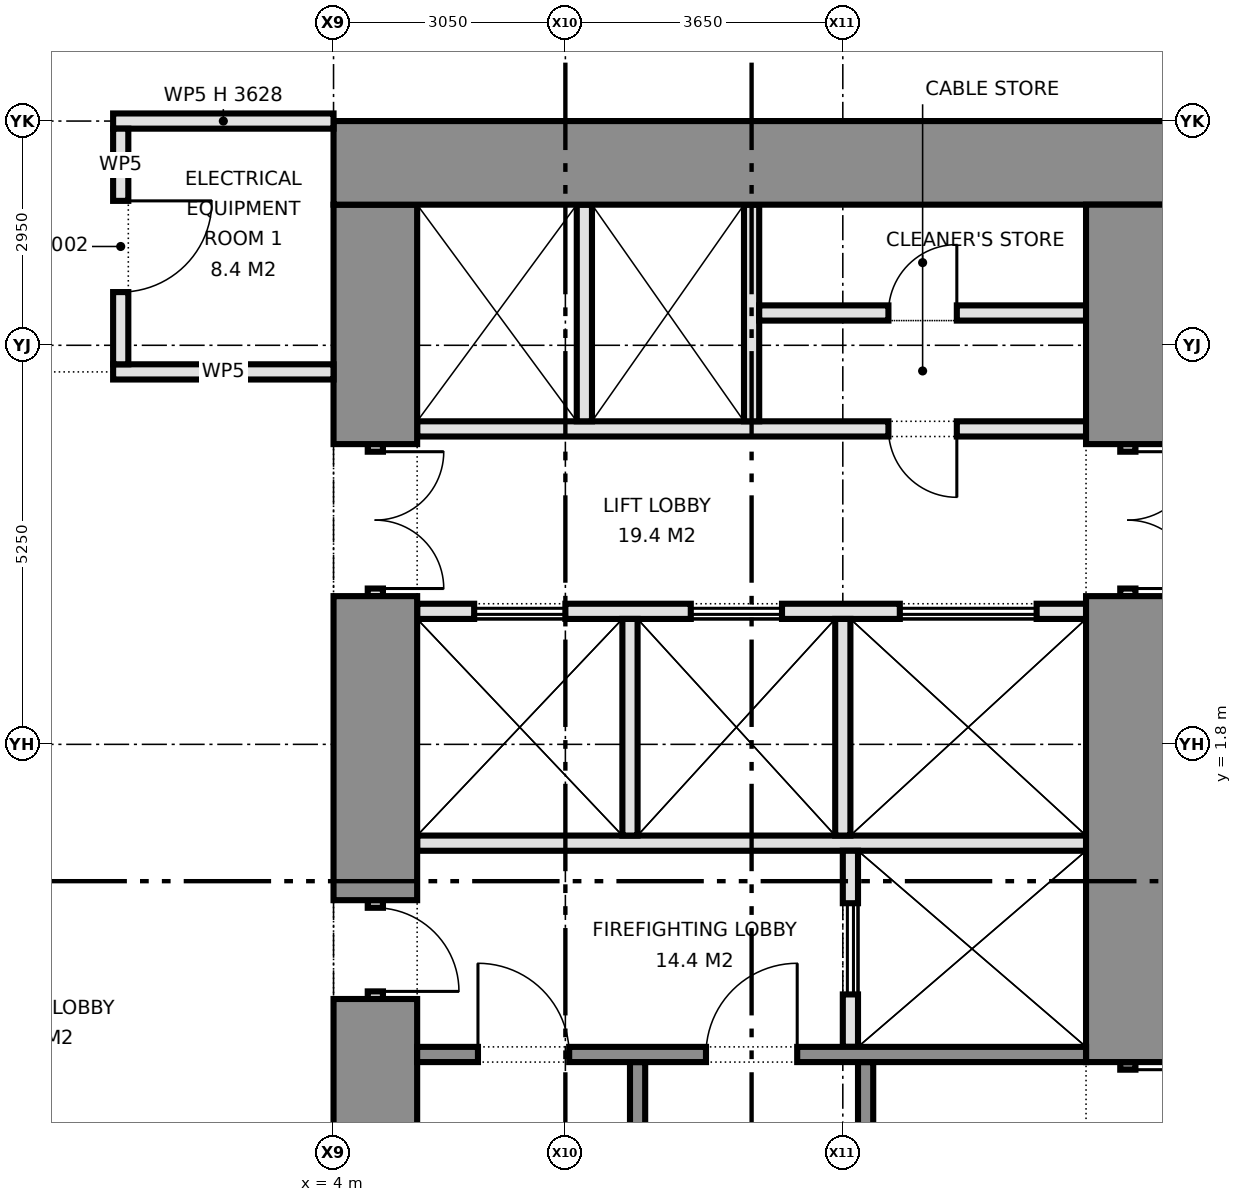
"""IFC4 building model, lengths in metres.
Left out: names, types, materials, properties, quantities, classifications, styles, units other than length and angle.
Written with IfcOpenShell. Run it as: python <this file> out.ifc"""

import sys

from ifc_helpers import new_model, si_unit, direction, frame, frame_2d, origin, place, context, subcontext, project, spatial, rectangle, extrude, element, fill, save


model = new_model("IFC4")
c1 = context("Model", 3, precision=1e-05, world=origin(), true_north=direction((0.0, 1.0)))
c2 = subcontext(c1, "Body", "Model", "MODEL_VIEW")
j1 = project(units=[si_unit("LENGTHUNIT", "METRE"), si_unit("PLANEANGLEUNIT", "RADIAN")], contexts=[c1])
p1 = place(None, origin())
s1 = spatial("IfcSite", under=j1, at=p1, CompositionType="ELEMENT")
p2 = place(p1, origin())
s2 = spatial("IfcBuilding", under=s1, at=p2, CompositionType="ELEMENT")
p3 = place(p2, frame((0.0, 0.0, 30.5)))
s3 = spatial("IfcBuildingStorey", under=s2, at=p3, CompositionType="ELEMENT", Elevation=30.5)
p4 = place(p3, frame((15.0, 9.45, 0.0), z_axis=(0.0, 0.0, 1.0), x_axis=(-1.0, 0.0, 0.0)))
e1 = element("IfcWall", 1, at=p4, inside=s3, PredefinedType="SHEAR", context=c2, shape_type="SweptSolid", body=[
    extrude(rectangle(XDim=11.0, YDim=1.1, at=frame_2d((5.5, 0.0))), origin(), (0.0, 0.0, 1.0), 4.575),
])
p5 = place(p3, frame((14.45, 8.9, 0.0), z_axis=(0.0, 0.0, 1.0), x_axis=(0.0, -1.0, 0.0)))
e2 = element("IfcWall", 2, at=p5, inside=s3, PredefinedType="SHEAR", context=c2, shape_type="SweptSolid", body=[
    extrude(rectangle(XDim=3.15, YDim=1.1, at=frame_2d((1.575, 0.0))), origin(), (0.0, 0.0, 1.0), 4.575),
])
p6 = place(p3, frame((14.45, 5.75, 0.0), z_axis=(0.0, 0.0, 1.0), x_axis=(0.0, -1.0, 0.0)))
e3 = element("IfcWall", 3, at=p6, inside=s3, PredefinedType="PARTITIONING", context=c2, shape_type="SweptSolid", body=[
    extrude(rectangle(XDim=2.0, YDim=0.2, at=frame_2d((1.0, 0.0))), origin(), (0.0, 0.0, 1.0), 2.4),
])
p7 = place(p6, frame((0.1, 0.0, 0.0)))
e4 = element("IfcOpeningElement", 4, at=p7, cuts=e3, PredefinedType="OPENING", context=c2, shape_type="SweptSolid", body=[
    extrude(rectangle(XDim=1.8, YDim=2.1, at=frame_2d((0.9, 1.05))), frame((0.0, 0.11, 0.0), z_axis=(0.0, -1.0, 0.0), x_axis=(1.0, 0.0, 0.0)), (0.0, 0.0, 1.0), 0.22),
])
p8 = place(p3, frame((14.45, 3.75, 0.0), z_axis=(0.0, 0.0, 1.0), x_axis=(0.0, -1.0, 0.0)))
e5 = element("IfcWall", 5, at=p8, inside=s3, PredefinedType="SHEAR", context=c2, shape_type="SweptSolid", body=[
    extrude(rectangle(XDim=6.13, YDim=1.1, at=frame_2d((3.065, 0.0))), origin(), (0.0, 0.0, 1.0), 4.575),
])
p9 = place(p3, frame((14.45, -2.38, 0.0), z_axis=(0.0, 0.0, 1.0), x_axis=(0.0, -1.0, 0.0)))
e6 = element("IfcWall", 6, at=p9, inside=s3, PredefinedType="SHEAR", context=c2, shape_type="SweptSolid", body=[
    extrude(rectangle(XDim=1.3, YDim=0.2, at=frame_2d((0.65, 0.0))), origin(), (0.0, 0.0, 1.0), 2.4),
])
p10 = place(p9, frame((0.1, 0.0, 0.0)))
e7 = element("IfcOpeningElement", 7, at=p10, cuts=e6, PredefinedType="OPENING", context=c2, shape_type="SweptSolid", body=[
    extrude(rectangle(XDim=1.1, YDim=2.1, at=frame_2d((0.55, 1.05))), frame((0.0, 0.11, 0.0), z_axis=(0.0, -1.0, 0.0), x_axis=(1.0, 0.0, 0.0)), (0.0, 0.0, 1.0), 0.22),
])
p11 = place(p3, frame((4.55, 8.9, 0.0), z_axis=(0.0, 0.0, 1.0), x_axis=(0.0, -1.0, 0.0)))
e8 = element("IfcWall", 8, at=p11, inside=s3, PredefinedType="SHEAR", context=c2, shape_type="SweptSolid", body=[
    extrude(rectangle(XDim=3.15, YDim=1.1, at=frame_2d((1.575, 0.0))), origin(), (0.0, 0.0, 1.0), 4.575),
])
p12 = place(p3, frame((4.55, 5.75, 0.0), z_axis=(0.0, 0.0, 1.0), x_axis=(0.0, -1.0, 0.0)))
e9 = element("IfcWall", 9, at=p12, inside=s3, PredefinedType="PARTITIONING", context=c2, shape_type="SweptSolid", body=[
    extrude(rectangle(XDim=2.0, YDim=0.2, at=frame_2d((1.0, 0.0))), origin(), (0.0, 0.0, 1.0), 2.4),
])
p13 = place(p12, frame((0.1, 0.0, 0.0)))
e10 = element("IfcOpeningElement", 10, at=p13, cuts=e9, PredefinedType="OPENING", context=c2, shape_type="SweptSolid", body=[
    extrude(rectangle(XDim=1.8, YDim=2.1, at=frame_2d((0.9, 1.05))), frame((0.0, 0.11, 0.0), z_axis=(0.0, -1.0, 0.0), x_axis=(1.0, 0.0, 0.0)), (0.0, 0.0, 1.0), 0.22),
])
p14 = place(p3, frame((4.55, 3.75, 0.0), z_axis=(0.0, 0.0, 1.0), x_axis=(0.0, -1.0, 0.0)))
e11 = element("IfcWall", 11, at=p14, inside=s3, PredefinedType="SHEAR", context=c2, shape_type="SweptSolid", body=[
    extrude(rectangle(XDim=4.0, YDim=1.1, at=frame_2d((2.0, 0.0))), origin(), (0.0, 0.0, 1.0), 4.575),
])
p15 = place(p3, frame((4.55, -0.25, 0.0), z_axis=(0.0, 0.0, 1.0), x_axis=(0.0, -1.0, 0.0)))
e12 = element("IfcWall", 12, at=p15, inside=s3, PredefinedType="PARTITIONING", context=c2, shape_type="SweptSolid", body=[
    extrude(rectangle(XDim=1.3, YDim=0.2, at=frame_2d((0.65, 0.0))), origin(), (0.0, 0.0, 1.0), 2.4),
])
p16 = place(p15, frame((0.1, 0.0, 0.0)))
e13 = element("IfcOpeningElement", 13, at=p16, cuts=e12, PredefinedType="OPENING", context=c2, shape_type="SweptSolid", body=[
    extrude(rectangle(XDim=1.1, YDim=2.1, at=frame_2d((0.55, 1.05))), frame((0.0, 0.11, 0.0), z_axis=(0.0, -1.0, 0.0), x_axis=(1.0, 0.0, 0.0)), (0.0, 0.0, 1.0), 0.22),
])
p17 = place(p3, frame((4.55, -1.55, 0.0), z_axis=(0.0, 0.0, 1.0), x_axis=(0.0, -1.0, 0.0)))
e14 = element("IfcWall", 14, at=p17, inside=s3, PredefinedType="SHEAR", context=c2, shape_type="SweptSolid", body=[
    extrude(rectangle(XDim=7.35, YDim=1.1, at=frame_2d((3.675, 0.0))), origin(), (0.0, 0.0, 1.0), 4.575),
])
p18 = place(p3, frame((13.9, 5.95, 0.0), z_axis=(0.0, 0.0, 1.0), x_axis=(-1.0, 0.0, 0.0)))
e15 = element("IfcWall", 15, at=p18, inside=s3, PredefinedType="PARTITIONING", context=c2, shape_type="SweptSolid", body=[
    extrude(rectangle(XDim=8.8, YDim=0.2, at=frame_2d((4.4, 0.0))), origin(), (0.0, 0.0, 1.0), 4.575),
])
p19 = place(p18, frame((1.7, 0.0, 0.0)))
e16 = element("IfcOpeningElement", 16, at=p19, cuts=e15, PredefinedType="OPENING", context=c2, shape_type="SweptSolid", body=[
    extrude(rectangle(XDim=0.9, YDim=2.1, at=frame_2d((0.45, 1.05))), frame((0.0, 0.11, 0.0), z_axis=(0.0, -1.0, 0.0), x_axis=(1.0, 0.0, 0.0)), (0.0, 0.0, 1.0), 0.22),
])
p20 = place(p3, frame((13.9, 3.55, 0.0), z_axis=(0.0, 0.0, 1.0), x_axis=(-1.0, 0.0, 0.0)))
e17 = element("IfcWall", 17, at=p20, inside=s3, PredefinedType="PARTITIONING", context=c2, shape_type="SweptSolid", body=[
    extrude(rectangle(XDim=8.8, YDim=0.2, at=frame_2d((4.4, 0.0))), origin(), (0.0, 0.0, 1.0), 4.575),
])
p21 = place(p20, frame((0.65, 0.0, 0.0)))
e18 = element("IfcOpeningElement", 18, at=p21, cuts=e17, PredefinedType="OPENING", context=c2, shape_type="SweptSolid", body=[
    extrude(rectangle(XDim=1.8, YDim=2.1, at=frame_2d((0.9, 1.05))), frame((0.0, 0.11, 0.0), z_axis=(0.0, -1.0, 0.0), x_axis=(1.0, 0.0, 0.0)), (0.0, 0.0, 1.0), 0.22),
])
p22 = place(p20, frame((4.0, 0.0, 0.0)))
e19 = element("IfcOpeningElement", 19, at=p22, cuts=e17, PredefinedType="OPENING", context=c2, shape_type="SweptSolid", body=[
    extrude(rectangle(XDim=1.2, YDim=2.1, at=frame_2d((0.6, 1.05))), frame((0.0, 0.11, 0.0), z_axis=(0.0, -1.0, 0.0), x_axis=(1.0, 0.0, 0.0)), (0.0, 0.0, 1.0), 0.22),
])
p23 = place(p20, frame((6.85, 0.0, 0.0)))
e20 = element("IfcOpeningElement", 20, at=p23, cuts=e17, PredefinedType="OPENING", context=c2, shape_type="SweptSolid", body=[
    extrude(rectangle(XDim=1.2, YDim=2.1, at=frame_2d((0.6, 1.05))), frame((0.0, 0.11, 0.0), z_axis=(0.0, -1.0, 0.0), x_axis=(1.0, 0.0, 0.0)), (0.0, 0.0, 1.0), 0.22),
])
p24 = place(p3, frame((13.9, 0.5, 0.0), z_axis=(0.0, 0.0, 1.0), x_axis=(-1.0, 0.0, 0.0)))
e21 = element("IfcWall", 21, at=p24, inside=s3, PredefinedType="PARTITIONING", context=c2, shape_type="SweptSolid", body=[
    extrude(rectangle(XDim=8.8, YDim=0.2, at=frame_2d((4.4, 0.0))), origin(), (0.0, 0.0, 1.0), 4.575),
])
p25 = place(p3, frame((10.8, 0.4, 0.0), z_axis=(0.0, 0.0, 1.0), x_axis=(0.0, -1.0, 0.0)))
e22 = element("IfcWall", 22, at=p25, inside=s3, PredefinedType="PARTITIONING", context=c2, shape_type="SweptSolid", body=[
    extrude(rectangle(XDim=2.58, YDim=0.2, at=frame_2d((1.29, 0.0))), origin(), (0.0, 0.0, 1.0), 4.575),
])
p26 = place(p25, frame((0.69, 0.0, 0.0)))
e23 = element("IfcOpeningElement", 23, at=p26, cuts=e22, PredefinedType="OPENING", context=c2, shape_type="SweptSolid", body=[
    extrude(rectangle(XDim=1.2, YDim=2.1, at=frame_2d((0.6, 1.05))), frame((0.0, 0.11, 0.0), z_axis=(0.0, -1.0, 0.0), x_axis=(1.0, 0.0, 0.0)), (0.0, 0.0, 1.0), 0.22),
])
p27 = place(p3, frame((13.9, -2.28, 0.0), z_axis=(0.0, 0.0, 1.0), x_axis=(-1.0, 0.0, 0.0)))
e24 = element("IfcWall", 24, at=p27, inside=s3, PredefinedType="SHEAR", context=c2, shape_type="SweptSolid", body=[
    extrude(rectangle(XDim=8.8, YDim=0.2, at=frame_2d((4.4, 0.0))), origin(), (0.0, 0.0, 1.0), 4.575),
])
p28 = place(p27, frame((3.8, 0.0, 0.0)))
e25 = element("IfcOpeningElement", 25, at=p28, cuts=e24, PredefinedType="OPENING", context=c2, shape_type="SweptSolid", body=[
    extrude(rectangle(XDim=1.2, YDim=2.1, at=frame_2d((0.6, 1.05))), frame((0.0, 0.11, 0.0), z_axis=(0.0, -1.0, 0.0), x_axis=(1.0, 0.0, 0.0)), (0.0, 0.0, 1.0), 0.22),
])
p29 = place(p27, frame((6.8, 0.0, 0.0)))
e26 = element("IfcOpeningElement", 26, at=p29, cuts=e24, PredefinedType="OPENING", context=c2, shape_type="SweptSolid", body=[
    extrude(rectangle(XDim=1.2, YDim=2.1, at=frame_2d((0.6, 1.05))), frame((0.0, 0.11, 0.0), z_axis=(0.0, -1.0, 0.0), x_axis=(1.0, 0.0, 0.0)), (0.0, 0.0, 1.0), 0.22),
])
for number, where, z_axis, x_axis in (
    (27, (11.0, -2.38, 0.0), (0.0, 0.0, 1.0), (0.0, -1.0, 0.0)),
    (28, (8.0, -2.38, 0.0), (0.0, 0.0, 1.0), (0.0, -1.0, 0.0)),
):
    element("IfcWall", number, at=place(p3, frame(where, z_axis=z_axis, x_axis=x_axis)), inside=s3, PredefinedType="SHEAR", context=c2, shape_type="SweptSolid", body=[
        extrude(rectangle(XDim=6.52, YDim=0.2, at=frame_2d((3.26, 0.0))), origin(), (0.0, 0.0, 1.0), 4.575),
    ])
for number, where, z_axis, x_axis in (
    (29, (9.5, 8.9, 0.0), (0.0, 0.0, 1.0), (0.0, -1.0, 0.0)),
    (30, (7.3, 8.9, 0.0), (0.0, 0.0, 1.0), (0.0, -1.0, 0.0)),
):
    element("IfcWall", number, at=place(p3, frame(where, z_axis=z_axis, x_axis=x_axis)), inside=s3, PredefinedType="PARTITIONING", context=c2, shape_type="SweptSolid", body=[
        extrude(rectangle(XDim=2.85, YDim=0.2, at=frame_2d((1.425, 0.0))), origin(), (0.0, 0.0, 1.0), 4.575),
    ])
p30 = place(p3, frame((13.9, 7.475, 0.0), z_axis=(0.0, 0.0, 1.0), x_axis=(-1.0, 0.0, 0.0)))
e31 = element("IfcWall", 31, at=p30, inside=s3, PredefinedType="PARTITIONING", context=c2, shape_type="SweptSolid", body=[
    extrude(rectangle(XDim=4.3, YDim=0.2, at=frame_2d((2.15, 0.0))), origin(), (0.0, 0.0, 1.0), 4.575),
])
p31 = place(p30, frame((1.7, 0.0, 0.0)))
e32 = element("IfcOpeningElement", 32, at=p31, cuts=e31, PredefinedType="OPENING", context=c2, shape_type="SweptSolid", body=[
    extrude(rectangle(XDim=0.9, YDim=2.1, at=frame_2d((0.45, 1.05))), frame((0.0, 0.11, 0.0), z_axis=(0.0, -1.0, 0.0), x_axis=(1.0, 0.0, 0.0)), (0.0, 0.0, 1.0), 0.22),
])
for number, where, z_axis, x_axis in (
    (33, (10.7, 3.45, 0.0), (0.0, 0.0, 1.0), (0.0, -1.0, 0.0)),
    (34, (7.9, 3.45, 0.0), (0.0, 0.0, 1.0), (0.0, -1.0, 0.0)),
):
    element("IfcWall", number, at=place(p3, frame(where, z_axis=z_axis, x_axis=x_axis)), inside=s3, PredefinedType="PARTITIONING", context=c2, shape_type="SweptSolid", body=[
        extrude(rectangle(XDim=2.85, YDim=0.2, at=frame_2d((1.425, 0.0))), origin(), (0.0, 0.0, 1.0), 4.575),
    ])
p32 = place(p3, frame((1.1, 6.7, 0.0), z_axis=(0.0, 0.0, 1.0), x_axis=(1.0, 0.0, 0.0)))
e35 = element("IfcWall", 35, at=p32, inside=s3, PredefinedType="PARTITIONING", context=c2, shape_type="SweptSolid", body=[
    extrude(rectangle(XDim=2.9, YDim=0.2, at=frame_2d((1.45, 0.0))), origin(), (0.0, 0.0, 1.0), 4.575),
])
p33 = place(p3, frame((1.1, 10.0, 0.0), z_axis=(0.0, 0.0, 1.0), x_axis=(1.0, 0.0, 0.0)))
e36 = element("IfcWall", 36, at=p33, inside=s3, PredefinedType="PARTITIONING", context=c2, shape_type="SweptSolid", body=[
    extrude(rectangle(XDim=2.9, YDim=0.2, at=frame_2d((1.45, 0.0))), origin(), (0.0, 0.0, 1.0), 3.628),
])
p34 = place(p3, frame((1.2, 6.8, 0.0), z_axis=(0.0, 0.0, 1.0), x_axis=(0.0, 1.0, 0.0)))
e37 = element("IfcWall", 37, at=p34, inside=s3, PredefinedType="PARTITIONING", context=c2, shape_type="SweptSolid", body=[
    extrude(rectangle(XDim=3.1, YDim=0.2, at=frame_2d((1.55, 0.0))), origin(), (0.0, 0.0, 1.0), 4.575),
])
p35 = place(p34, frame((0.95, 0.0, 0.0)))
e38 = element("IfcOpeningElement", 38, at=p35, cuts=e37, PredefinedType="OPENING", context=c2, shape_type="SweptSolid", body=[
    extrude(rectangle(XDim=1.2, YDim=2.1, at=frame_2d((0.6, 1.05))), frame((0.0, 0.11, 0.0), z_axis=(0.0, -1.0, 0.0), x_axis=(1.0, 0.0, 0.0)), (0.0, 0.0, 1.0), 0.22),
])
p36 = place(p7, origin())
e39 = element("IfcDoor", 39, at=p36, inside=s3, OperationType="DOUBLE_DOOR_SINGLE_SWING", PredefinedType="DOOR", context=c2, shape_type="SweptSolid", body=[
    extrude(rectangle(XDim=1.8, YDim=2.1, at=frame_2d((0.9, 1.05))), frame((0.0, 0.025, 0.0), z_axis=(0.0, -1.0, 0.0), x_axis=(1.0, 0.0, 0.0)), (0.0, 0.0, 1.0), 0.05),
])
fill(e4, e39)
p37 = place(p10, origin())
e40 = element("IfcDoor", 40, at=p37, inside=s3, OperationType="SINGLE_SWING_LEFT", PredefinedType="DOOR", context=c2, shape_type="SweptSolid", body=[
    extrude(rectangle(XDim=1.1, YDim=2.1, at=frame_2d((0.55, 1.05))), frame((0.0, 0.025, 0.0), z_axis=(0.0, -1.0, 0.0), x_axis=(1.0, 0.0, 0.0)), (0.0, 0.0, 1.0), 0.05),
])
fill(e7, e40)
p38 = place(p13, origin())
e41 = element("IfcDoor", 41, at=p38, inside=s3, OperationType="DOUBLE_DOOR_SINGLE_SWING", PredefinedType="DOOR", context=c2, shape_type="SweptSolid", body=[
    extrude(rectangle(XDim=1.8, YDim=2.1, at=frame_2d((0.9, 1.05))), frame((0.0, 0.025, 0.0), z_axis=(0.0, -1.0, 0.0), x_axis=(1.0, 0.0, 0.0)), (0.0, 0.0, 1.0), 0.05),
])
fill(e10, e41)
p39 = place(p16, origin())
e42 = element("IfcDoor", 42, at=p39, inside=s3, OperationType="SINGLE_SWING_RIGHT", PredefinedType="DOOR", context=c2, shape_type="SweptSolid", body=[
    extrude(rectangle(XDim=1.1, YDim=2.1, at=frame_2d((0.55, 1.05))), frame((0.0, 0.025, 0.0), z_axis=(0.0, -1.0, 0.0), x_axis=(1.0, 0.0, 0.0)), (0.0, 0.0, 1.0), 0.05),
])
fill(e13, e42)
p40 = place(p21, origin())
e43 = element("IfcDoor", 43, at=p40, inside=s3, OperationType="DOUBLE_DOOR_SLIDING", PredefinedType="DOOR", context=c2, shape_type="SweptSolid", body=[
    extrude(rectangle(XDim=1.8, YDim=2.1, at=frame_2d((0.9, 1.05))), frame((0.0, 0.025, 0.0), z_axis=(0.0, -1.0, 0.0), x_axis=(1.0, 0.0, 0.0)), (0.0, 0.0, 1.0), 0.05),
])
fill(e18, e43)
p41 = place(p22, origin())
e44 = element("IfcDoor", 44, at=p41, inside=s3, OperationType="DOUBLE_DOOR_SLIDING", PredefinedType="DOOR", context=c2, shape_type="SweptSolid", body=[
    extrude(rectangle(XDim=1.2, YDim=2.1, at=frame_2d((0.6, 1.05))), frame((0.0, 0.025, 0.0), z_axis=(0.0, -1.0, 0.0), x_axis=(1.0, 0.0, 0.0)), (0.0, 0.0, 1.0), 0.05),
])
fill(e19, e44)
p42 = place(p23, origin())
e45 = element("IfcDoor", 45, at=p42, inside=s3, OperationType="DOUBLE_DOOR_SLIDING", PredefinedType="DOOR", context=c2, shape_type="SweptSolid", body=[
    extrude(rectangle(XDim=1.2, YDim=2.1, at=frame_2d((0.6, 1.05))), frame((0.0, 0.025, 0.0), z_axis=(0.0, -1.0, 0.0), x_axis=(1.0, 0.0, 0.0)), (0.0, 0.0, 1.0), 0.05),
])
fill(e20, e45)
p43 = place(p26, origin())
e46 = element("IfcDoor", 46, at=p43, inside=s3, OperationType="DOUBLE_DOOR_SLIDING", PredefinedType="DOOR", context=c2, shape_type="SweptSolid", body=[
    extrude(rectangle(XDim=1.2, YDim=2.1, at=frame_2d((0.6, 1.05))), frame((0.0, 0.025, 0.0), z_axis=(0.0, -1.0, 0.0), x_axis=(1.0, 0.0, 0.0)), (0.0, 0.0, 1.0), 0.05),
])
fill(e23, e46)
p44 = place(p19, origin())
e47 = element("IfcDoor", 47, at=p44, inside=s3, OperationType="SINGLE_SWING_LEFT", PredefinedType="DOOR", context=c2, shape_type="SweptSolid", body=[
    extrude(rectangle(XDim=0.9, YDim=2.1, at=frame_2d((0.45, 1.05))), frame((0.0, 0.025, 0.0), z_axis=(0.0, -1.0, 0.0), x_axis=(1.0, 0.0, 0.0)), (0.0, 0.0, 1.0), 0.05),
])
fill(e16, e47)
p45 = place(p31, frame((0.9, 0.0, 0.0), z_axis=(0.0, 0.0, 1.0), x_axis=(-1.0, 0.0, 0.0)))
e48 = element("IfcDoor", 48, at=p45, inside=s3, OperationType="SINGLE_SWING_RIGHT", PredefinedType="DOOR", context=c2, shape_type="SweptSolid", body=[
    extrude(rectangle(XDim=0.9, YDim=2.1, at=frame_2d((0.45, 1.05))), frame((0.0, 0.025, 0.0), z_axis=(0.0, -1.0, 0.0), x_axis=(1.0, 0.0, 0.0)), (0.0, 0.0, 1.0), 0.05),
])
fill(e32, e48)
p46 = place(p28, frame((1.2, 0.0, 0.0), z_axis=(0.0, 0.0, 1.0), x_axis=(-1.0, 0.0, 0.0)))
e49 = element("IfcDoor", 49, at=p46, inside=s3, OperationType="SINGLE_SWING_RIGHT", PredefinedType="DOOR", context=c2, shape_type="SweptSolid", body=[
    extrude(rectangle(XDim=1.2, YDim=2.1, at=frame_2d((0.6, 1.05))), frame((0.0, 0.025, 0.0), z_axis=(0.0, -1.0, 0.0), x_axis=(1.0, 0.0, 0.0)), (0.0, 0.0, 1.0), 0.05),
])
fill(e25, e49)
p47 = place(p29, frame((1.2, 0.0, 0.0), z_axis=(0.0, 0.0, 1.0), x_axis=(-1.0, 0.0, 0.0)))
e50 = element("IfcDoor", 50, at=p47, inside=s3, OperationType="SINGLE_SWING_LEFT", PredefinedType="DOOR", context=c2, shape_type="SweptSolid", body=[
    extrude(rectangle(XDim=1.2, YDim=2.1, at=frame_2d((0.6, 1.05))), frame((0.0, 0.025, 0.0), z_axis=(0.0, -1.0, 0.0), x_axis=(1.0, 0.0, 0.0)), (0.0, 0.0, 1.0), 0.05),
])
fill(e26, e50)
p48 = place(p35, frame((1.2, 0.0, 0.0), z_axis=(0.0, 0.0, 1.0), x_axis=(-1.0, 0.0, 0.0)))
e51 = element("IfcDoor", 51, at=p48, inside=s3, OperationType="SINGLE_SWING_LEFT", PredefinedType="DOOR", context=c2, shape_type="SweptSolid", body=[
    extrude(rectangle(XDim=1.2, YDim=2.1, at=frame_2d((0.6, 1.05))), frame((0.0, 0.025, 0.0), z_axis=(0.0, -1.0, 0.0), x_axis=(1.0, 0.0, 0.0)), (0.0, 0.0, 1.0), 0.05),
])
fill(e38, e51)
save(model, sys.argv[1])
